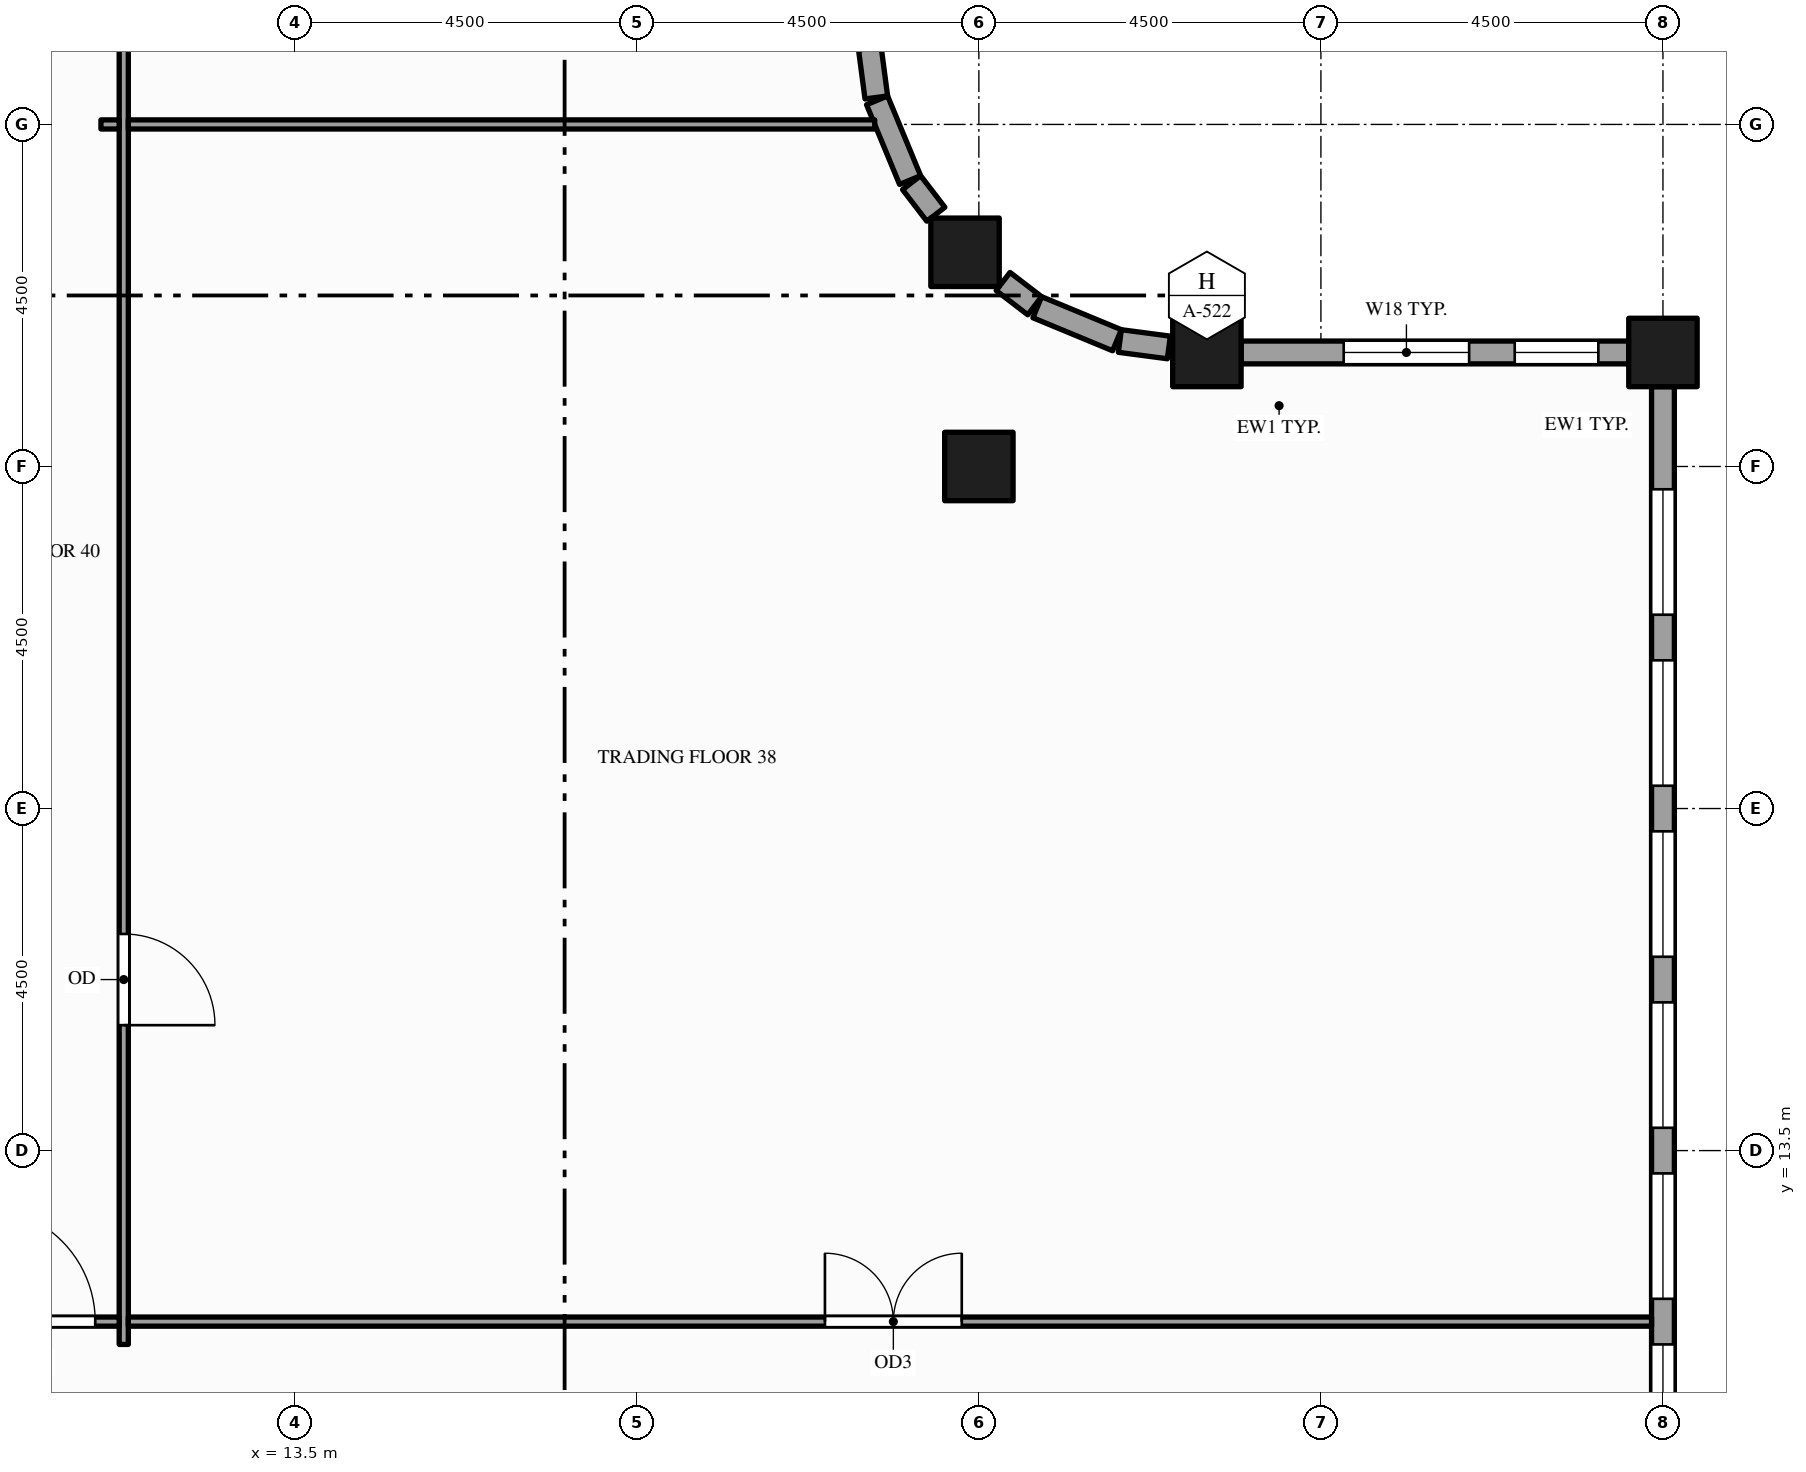
"""IFC4 building model, lengths in metres.
Left out: names, types, materials, properties, quantities, classifications, styles, units other than length and angle.
Written with IfcOpenShell. Run it as: python <this file> out.ifc"""

import sys

from ifc_helpers import new_model, si_unit, direction, frame, frame_2d, origin, origin_2d, place, context, subcontext, project, spatial, rectangle, hollow_rectangle, extrude, element, fill, save


model = new_model("IFC4")
c1 = context("Model", 3, precision=1e-05, world=origin(), true_north=direction((0.0, 1.0)))
c2 = subcontext(c1, "Body", "Model", "MODEL_VIEW")
j1 = project(units=[si_unit("LENGTHUNIT", "METRE"), si_unit("PLANEANGLEUNIT", "RADIAN")], contexts=[c1])
p1 = place(None, origin())
s1 = spatial("IfcSite", under=j1, at=p1, CompositionType="ELEMENT")
p2 = place(p1, origin())
s2 = spatial("IfcBuilding", under=s1, at=p2, CompositionType="ELEMENT")
p3 = place(p2, frame((0.0, 0.0, 143.0)))
s3 = spatial("IfcBuildingStorey", under=s2, at=p3, CompositionType="ELEMENT", Elevation=143.0)
for number, where, z_axis, x_axis in (
    (1, (22.318, 25.318, -0.15), (0.0, 0.0, 1.0), (1.0, 0.0, 0.0)),
    (2, (22.5, 22.5, -0.15), (0.0, 0.0, 1.0), (1.0, 0.0, 0.0)),
    (3, (25.5, 24.0, -0.15), (0.0, 0.0, 1.0), (1.0, 0.0, 0.0)),
    (4, (31.5, 24.0, -0.15), (0.0, 0.0, 1.0), (1.0, 0.0, 0.0)),
):
    element("IfcColumn", number, at=place(p3, frame(where, z_axis=z_axis, x_axis=x_axis)), inside=s3, PredefinedType="COLUMN", context=c2, shape_type="SweptSolid", body=[
        extrude(hollow_rectangle(XDim=0.9, YDim=0.9, WallThickness=0.045, at=origin_2d()), origin(), (0.0, 0.0, 1.0), 4.0),
    ])
p4 = place(p3, frame((31.05, 24.0, 0.0), z_axis=(0.0, 0.0, 1.0), x_axis=(-1.0, 0.0, 0.0)))
e5 = element("IfcWall", 5, at=p4, inside=s3, PredefinedType="STANDARD", context=c2, shape_type="SweptSolid", body=[
    extrude(rectangle(XDim=5.1, YDim=0.3, at=frame_2d((2.55, 0.0))), origin(), (0.0, 0.0, 1.0), 2.87),
])
p5 = place(p4, frame((0.4, 0.0, 0.9)))
e6 = element("IfcOpeningElement", 6, at=p5, cuts=e5, PredefinedType="OPENING", context=c2, shape_type="SweptSolid", body=[
    extrude(rectangle(XDim=1.1, YDim=1.75, at=frame_2d((0.55, 0.875))), frame((0.0, 0.16, 0.0), z_axis=(0.0, -1.0, 0.0), x_axis=(1.0, 0.0, 0.0)), (0.0, 0.0, 1.0), 0.32),
])
p6 = place(p4, frame((2.1, 0.0, 0.9)))
e7 = element("IfcOpeningElement", 7, at=p6, cuts=e5, PredefinedType="OPENING", context=c2, shape_type="SweptSolid", body=[
    extrude(rectangle(XDim=1.65, YDim=1.75, at=frame_2d((0.825, 0.875))), frame((0.0, 0.16, 0.0), z_axis=(0.0, -1.0, 0.0), x_axis=(1.0, 0.0, 0.0)), (0.0, 0.0, 1.0), 0.32),
])
p7 = place(p3, frame((25.0, 24.066, 0.0), z_axis=(0.0, 0.0, 1.0), x_axis=(-0.991423590996, 0.130687655177, 0.0)))
e8 = element("IfcWall", 8, at=p7, inside=s3, PredefinedType="STANDARD", context=c2, shape_type="SweptSolid", body=[
    extrude(rectangle(XDim=0.65, YDim=0.3, at=frame_2d((0.325, 0.0))), origin(), (0.0, 0.0, 1.0), 2.87),
])
p8 = place(p3, frame((24.317, 24.161, 0.0), z_axis=(0.0, 0.0, 1.0), x_axis=(-0.923914616768, 0.382598720491, 0.0)))
e9 = element("IfcWall", 9, at=p8, inside=s3, PredefinedType="STANDARD", context=c2, shape_type="SweptSolid", body=[
    extrude(rectangle(XDim=1.135, YDim=0.3, at=frame_2d((0.568, 0.0))), origin(), (0.0, 0.0, 1.0), 3.149),
])
for number, where, z_axis, x_axis in (
    (10, (23.234, 24.615, 0.0), (0.0, 0.0, 1.0), (-0.794, 0.609, 0.0)),
    (11, (21.934, 25.819, 0.0), (0.0, 0.0, 1.0), (-0.609, 0.794, 0.0)),
):
    element("IfcWall", number, at=place(p3, frame(where, z_axis=z_axis, x_axis=x_axis)), inside=s3, PredefinedType="STANDARD", context=c2, shape_type="SweptSolid", body=[
        extrude(rectangle(XDim=0.524, YDim=0.3, at=frame_2d((0.262, 0.0))), origin(), (0.0, 0.0, 1.0), 3.149),
    ])
p9 = place(p3, frame((21.595, 26.268, 0.0), z_axis=(0.0, 0.0, 1.0), x_axis=(-0.382598720491, 0.923914616768, 0.0)))
e12 = element("IfcWall", 12, at=p9, inside=s3, PredefinedType="STANDARD", context=c2, shape_type="SweptSolid", body=[
    extrude(rectangle(XDim=1.135, YDim=0.3, at=frame_2d((0.568, 0.0))), origin(), (0.0, 0.0, 1.0), 3.149),
])
p10 = place(p3, frame((21.151, 27.355, 0.0), z_axis=(0.0, 0.0, 1.0), x_axis=(-0.130687655177, 0.991423590996, 0.0)))
e13 = element("IfcWall", 13, at=p10, inside=s3, PredefinedType="STANDARD", context=c2, shape_type="SweptSolid", body=[
    extrude(rectangle(XDim=0.65, YDim=0.3, at=frame_2d((0.325, 0.0))), origin(), (0.0, 0.0, 1.0), 3.149),
])
p11 = place(p3, frame((31.5, 1.95, 0.0), z_axis=(0.0, 0.0, 1.0), x_axis=(0.0, 1.0, 0.0)))
e14 = element("IfcWall", 14, at=p11, inside=s3, PredefinedType="STANDARD", context=c2, shape_type="SweptSolid", body=[
    extrude(rectangle(XDim=21.6, YDim=0.3, at=frame_2d((10.8, 0.0))), origin(), (0.0, 0.0, 1.0), 3.149),
])
p12 = place(p11, frame((0.6, 0.0, 0.9)))
e15 = element("IfcOpeningElement", 15, at=p12, cuts=e14, PredefinedType="OPENING", context=c2, shape_type="SweptSolid", body=[
    extrude(rectangle(XDim=1.65, YDim=2.0, at=frame_2d((0.825, 1.0))), frame((0.0, 0.16, 0.0), z_axis=(0.0, -1.0, 0.0), x_axis=(1.0, 0.0, 0.0)), (0.0, 0.0, 1.0), 0.32),
])
p13 = place(p11, frame((2.85, 0.0, 0.9)))
e16 = element("IfcOpeningElement", 16, at=p13, cuts=e14, PredefinedType="OPENING", context=c2, shape_type="SweptSolid", body=[
    extrude(rectangle(XDim=1.65, YDim=2.0, at=frame_2d((0.825, 1.0))), frame((0.0, 0.16, 0.0), z_axis=(0.0, -1.0, 0.0), x_axis=(1.0, 0.0, 0.0)), (0.0, 0.0, 1.0), 0.32),
])
p14 = place(p11, frame((5.1, 0.0, 0.9)))
e17 = element("IfcOpeningElement", 17, at=p14, cuts=e14, PredefinedType="OPENING", context=c2, shape_type="SweptSolid", body=[
    extrude(rectangle(XDim=1.65, YDim=2.0, at=frame_2d((0.825, 1.0))), frame((0.0, 0.16, 0.0), z_axis=(0.0, -1.0, 0.0), x_axis=(1.0, 0.0, 0.0)), (0.0, 0.0, 1.0), 0.32),
])
p15 = place(p11, frame((7.35, 0.0, 0.9)))
e18 = element("IfcOpeningElement", 18, at=p15, cuts=e14, PredefinedType="OPENING", context=c2, shape_type="SweptSolid", body=[
    extrude(rectangle(XDim=1.65, YDim=2.0, at=frame_2d((0.825, 1.0))), frame((0.0, 0.16, 0.0), z_axis=(0.0, -1.0, 0.0), x_axis=(1.0, 0.0, 0.0)), (0.0, 0.0, 1.0), 0.32),
])
p16 = place(p11, frame((9.6, 0.0, 0.9)))
e19 = element("IfcOpeningElement", 19, at=p16, cuts=e14, PredefinedType="OPENING", context=c2, shape_type="SweptSolid", body=[
    extrude(rectangle(XDim=1.65, YDim=2.0, at=frame_2d((0.825, 1.0))), frame((0.0, 0.16, 0.0), z_axis=(0.0, -1.0, 0.0), x_axis=(1.0, 0.0, 0.0)), (0.0, 0.0, 1.0), 0.32),
])
p17 = place(p11, frame((11.85, 0.0, 0.9)))
e20 = element("IfcOpeningElement", 20, at=p17, cuts=e14, PredefinedType="OPENING", context=c2, shape_type="SweptSolid", body=[
    extrude(rectangle(XDim=1.65, YDim=2.0, at=frame_2d((0.825, 1.0))), frame((0.0, 0.16, 0.0), z_axis=(0.0, -1.0, 0.0), x_axis=(1.0, 0.0, 0.0)), (0.0, 0.0, 1.0), 0.32),
])
p18 = place(p11, frame((14.1, 0.0, 0.9)))
e21 = element("IfcOpeningElement", 21, at=p18, cuts=e14, PredefinedType="OPENING", context=c2, shape_type="SweptSolid", body=[
    extrude(rectangle(XDim=1.65, YDim=2.0, at=frame_2d((0.825, 1.0))), frame((0.0, 0.16, 0.0), z_axis=(0.0, -1.0, 0.0), x_axis=(1.0, 0.0, 0.0)), (0.0, 0.0, 1.0), 0.32),
])
p19 = place(p11, frame((16.35, 0.0, 0.9)))
e22 = element("IfcOpeningElement", 22, at=p19, cuts=e14, PredefinedType="OPENING", context=c2, shape_type="SweptSolid", body=[
    extrude(rectangle(XDim=1.65, YDim=2.0, at=frame_2d((0.825, 1.0))), frame((0.0, 0.16, 0.0), z_axis=(0.0, -1.0, 0.0), x_axis=(1.0, 0.0, 0.0)), (0.0, 0.0, 1.0), 0.32),
])
p20 = place(p11, frame((18.6, 0.0, 0.9)))
e23 = element("IfcOpeningElement", 23, at=p20, cuts=e14, PredefinedType="OPENING", context=c2, shape_type="SweptSolid", body=[
    extrude(rectangle(XDim=1.65, YDim=2.0, at=frame_2d((0.825, 1.0))), frame((0.0, 0.16, 0.0), z_axis=(0.0, -1.0, 0.0), x_axis=(1.0, 0.0, 0.0)), (0.0, 0.0, 1.0), 0.32),
])
p21 = place(p3, frame((11.25, 10.95, 0.0), z_axis=(0.0, 0.0, 1.0), x_axis=(0.0, 1.0, 0.0)))
e24 = element("IfcWall", 24, at=p21, inside=s3, PredefinedType="PARTITIONING", context=c2, shape_type="SweptSolid", body=[
    extrude(rectangle(XDim=20.85, YDim=0.12, at=frame_2d((10.425, 0.0))), origin(), (0.0, 0.0, 1.0), 2.6),
])
p22 = place(p21, frame((17.8, 0.0, 0.0)))
e25 = element("IfcOpeningElement", 25, at=p22, cuts=e24, PredefinedType="OPENING", context=c2, shape_type="SweptSolid", body=[
    extrude(rectangle(XDim=1.0, YDim=2.1, at=frame_2d((0.5, 1.05))), frame((0.0, 0.07, 0.0), z_axis=(0.0, -1.0, 0.0), x_axis=(1.0, 0.0, 0.0)), (0.0, 0.0, 1.0), 0.14),
])
p23 = place(p21, frame((4.2, 0.0, 0.0)))
e26 = element("IfcOpeningElement", 26, at=p23, cuts=e24, PredefinedType="OPENING", context=c2, shape_type="SweptSolid", body=[
    extrude(rectangle(XDim=1.2, YDim=2.1, at=frame_2d((0.6, 1.05))), frame((0.0, 0.07, 0.0), z_axis=(0.0, -1.0, 0.0), x_axis=(1.0, 0.0, 0.0)), (0.0, 0.0, 1.0), 0.14),
])
p24 = place(p3, frame((9.06, 11.25, 0.0), z_axis=(0.0, 0.0, 1.0), x_axis=(1.0, 0.0, 0.0)))
e27 = element("IfcWall", 27, at=p24, inside=s3, PredefinedType="PARTITIONING", context=c2, shape_type="SweptSolid", body=[
    extrude(rectangle(XDim=2.13, YDim=0.12, at=frame_2d((1.065, 0.0))), origin(), (0.0, 0.0, 1.0), 2.87),
])
p25 = place(p24, frame((0.315, 0.0, 0.0)))
e28 = element("IfcOpeningElement", 28, at=p25, cuts=e27, PredefinedType="OPENING", context=c2, shape_type="SweptSolid", body=[
    extrude(rectangle(XDim=1.5, YDim=2.1, at=frame_2d((0.75, 1.05))), frame((0.0, 0.07, 0.0), z_axis=(0.0, -1.0, 0.0), x_axis=(1.0, 0.0, 0.0)), (0.0, 0.0, 1.0), 0.14),
])
p26 = place(p3, frame((11.31, 11.25, 0.0), z_axis=(0.0, 0.0, 1.0), x_axis=(1.0, 0.0, 0.0)))
e29 = element("IfcWall", 29, at=p26, inside=s3, PredefinedType="PARTITIONING", context=c2, shape_type="SweptSolid", body=[
    extrude(rectangle(XDim=20.04, YDim=0.12, at=frame_2d((10.02, 0.0))), origin(), (0.0, 0.0, 1.0), 2.87),
])
p27 = place(p26, frame((9.165, 0.0, 0.0)))
e30 = element("IfcOpeningElement", 30, at=p27, cuts=e29, PredefinedType="OPENING", context=c2, shape_type="SweptSolid", body=[
    extrude(rectangle(XDim=1.8, YDim=2.1, at=frame_2d((0.9, 1.05))), frame((0.0, 0.07, 0.0), z_axis=(0.0, -1.0, 0.0), x_axis=(1.0, 0.0, 0.0)), (0.0, 0.0, 1.0), 0.14),
])
p28 = place(p3, frame((10.95, 27.0, 0.0), z_axis=(0.0, 0.0, 1.0), x_axis=(1.0, 0.0, 0.0)))
e31 = element("IfcWall", 31, at=p28, inside=s3, PredefinedType="PARTITIONING", context=c2, shape_type="SweptSolid", body=[
    extrude(rectangle(XDim=0.24, YDim=0.12, at=frame_2d((0.12, 0.0))), origin(), (0.0, 0.0, 1.0), 2.87),
])
p29 = place(p3, frame((11.31, 27.0, 0.0), z_axis=(0.0, 0.0, 1.0), x_axis=(1.0, 0.0, 0.0)))
e32 = element("IfcWall", 32, at=p29, inside=s3, PredefinedType="PARTITIONING", context=c2, shape_type="SweptSolid", body=[
    extrude(rectangle(XDim=9.82, YDim=0.12, at=frame_2d((4.91, 0.0))), origin(), (0.0, 0.0, 1.0), 2.87),
])
p30 = place(p5, origin())
e33 = element("IfcWindow", 33, at=p30, inside=s3, PartitioningType="SINGLE_PANEL", PredefinedType="WINDOW", context=c2, shape_type="SweptSolid", body=[
    extrude(rectangle(XDim=1.1, YDim=1.75, at=frame_2d((0.55, 0.875))), frame((0.0, 0.03, 0.0), z_axis=(0.0, -1.0, 0.0), x_axis=(1.0, 0.0, 0.0)), (0.0, 0.0, 1.0), 0.06),
])
fill(e6, e33)
p31 = place(p6, origin())
e34 = element("IfcWindow", 34, at=p31, inside=s3, PartitioningType="SINGLE_PANEL", PredefinedType="WINDOW", context=c2, shape_type="SweptSolid", body=[
    extrude(rectangle(XDim=1.65, YDim=1.75, at=frame_2d((0.825, 0.875))), frame((0.0, 0.03, 0.0), z_axis=(0.0, -1.0, 0.0), x_axis=(1.0, 0.0, 0.0)), (0.0, 0.0, 1.0), 0.06),
])
fill(e7, e34)
p32 = place(p15, origin())
e35 = element("IfcWindow", 35, at=p32, inside=s3, PartitioningType="SINGLE_PANEL", PredefinedType="WINDOW", context=c2, shape_type="SweptSolid", body=[
    extrude(rectangle(XDim=1.65, YDim=2.0, at=frame_2d((0.825, 1.0))), frame((0.0, 0.03, 0.0), z_axis=(0.0, -1.0, 0.0), x_axis=(1.0, 0.0, 0.0)), (0.0, 0.0, 1.0), 0.06),
])
fill(e18, e35)
p33 = place(p16, origin())
e36 = element("IfcWindow", 36, at=p33, inside=s3, PartitioningType="SINGLE_PANEL", PredefinedType="WINDOW", context=c2, shape_type="SweptSolid", body=[
    extrude(rectangle(XDim=1.65, YDim=2.0, at=frame_2d((0.825, 1.0))), frame((0.0, 0.03, 0.0), z_axis=(0.0, -1.0, 0.0), x_axis=(1.0, 0.0, 0.0)), (0.0, 0.0, 1.0), 0.06),
])
fill(e19, e36)
p34 = place(p17, origin())
e37 = element("IfcWindow", 37, at=p34, inside=s3, PartitioningType="SINGLE_PANEL", PredefinedType="WINDOW", context=c2, shape_type="SweptSolid", body=[
    extrude(rectangle(XDim=1.65, YDim=2.0, at=frame_2d((0.825, 1.0))), frame((0.0, 0.03, 0.0), z_axis=(0.0, -1.0, 0.0), x_axis=(1.0, 0.0, 0.0)), (0.0, 0.0, 1.0), 0.06),
])
fill(e20, e37)
p35 = place(p18, origin())
e38 = element("IfcWindow", 38, at=p35, inside=s3, PartitioningType="SINGLE_PANEL", PredefinedType="WINDOW", context=c2, shape_type="SweptSolid", body=[
    extrude(rectangle(XDim=1.65, YDim=2.0, at=frame_2d((0.825, 1.0))), frame((0.0, 0.03, 0.0), z_axis=(0.0, -1.0, 0.0), x_axis=(1.0, 0.0, 0.0)), (0.0, 0.0, 1.0), 0.06),
])
fill(e21, e38)
p36 = place(p19, origin())
e39 = element("IfcWindow", 39, at=p36, inside=s3, PartitioningType="SINGLE_PANEL", PredefinedType="WINDOW", context=c2, shape_type="SweptSolid", body=[
    extrude(rectangle(XDim=1.65, YDim=2.0, at=frame_2d((0.825, 1.0))), frame((0.0, 0.03, 0.0), z_axis=(0.0, -1.0, 0.0), x_axis=(1.0, 0.0, 0.0)), (0.0, 0.0, 1.0), 0.06),
])
fill(e22, e39)
p37 = place(p20, origin())
e40 = element("IfcWindow", 40, at=p37, inside=s3, PartitioningType="SINGLE_PANEL", PredefinedType="WINDOW", context=c2, shape_type="SweptSolid", body=[
    extrude(rectangle(XDim=1.65, YDim=2.0, at=frame_2d((0.825, 1.0))), frame((0.0, 0.03, 0.0), z_axis=(0.0, -1.0, 0.0), x_axis=(1.0, 0.0, 0.0)), (0.0, 0.0, 1.0), 0.06),
])
fill(e23, e40)
p38 = place(p27, origin())
e41 = element("IfcDoor", 41, at=p38, inside=s3, OperationType="DOUBLE_DOOR_SINGLE_SWING", PredefinedType="DOOR", context=c2, shape_type="SweptSolid", body=[
    extrude(rectangle(XDim=1.8, YDim=2.1, at=frame_2d((0.9, 1.05))), frame((0.0, 0.025, 0.0), z_axis=(0.0, -1.0, 0.0), x_axis=(1.0, 0.0, 0.0)), (0.0, 0.0, 1.0), 0.05),
])
fill(e30, e41)
p39 = place(p25, origin())
e42 = element("IfcDoor", 42, at=p39, inside=s3, OperationType="SINGLE_SWING_LEFT", PredefinedType="DOOR", context=c2, shape_type="SweptSolid", body=[
    extrude(rectangle(XDim=1.5, YDim=2.1, at=frame_2d((0.75, 1.05))), frame((0.0, 0.025, 0.0), z_axis=(0.0, -1.0, 0.0), x_axis=(1.0, 0.0, 0.0)), (0.0, 0.0, 1.0), 0.05),
])
fill(e28, e42)
p40 = place(p23, origin())
e43 = element("IfcDoor", 43, at=p40, inside=s3, OperationType="SINGLE_SWING_LEFT", PredefinedType="DOOR", context=c2, shape_type="SweptSolid", body=[
    extrude(rectangle(XDim=1.2, YDim=2.1, at=frame_2d((0.6, 1.05))), frame((0.0, 0.025, 0.0), z_axis=(0.0, -1.0, 0.0), x_axis=(1.0, 0.0, 0.0)), (0.0, 0.0, 1.0), 0.05),
])
fill(e26, e43)
save(model, sys.argv[1])
